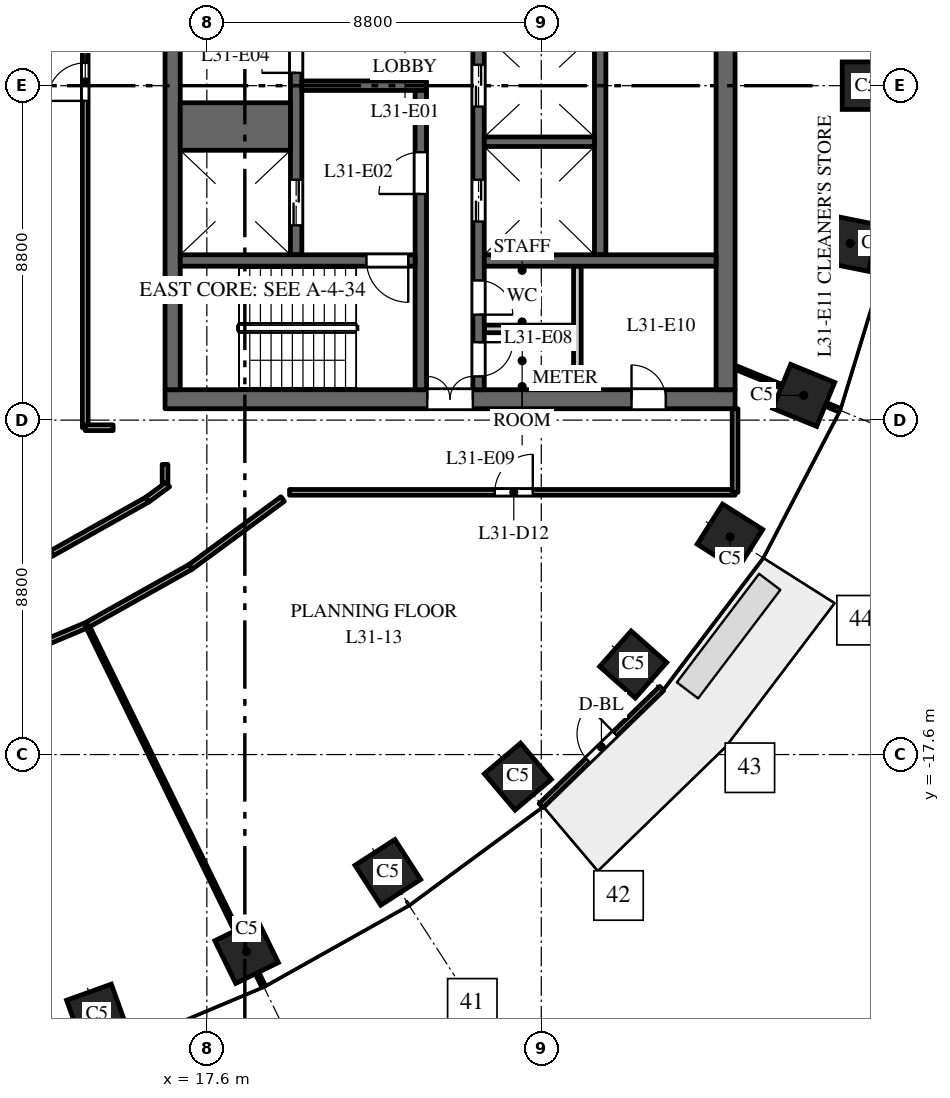
"""IFC4 building model, lengths in metres.
Left out: names, types, materials, properties, quantities, classifications, styles, units other than length and angle.
Written with IfcOpenShell. Run it as: python <this file> out.ifc"""

import sys

from ifc_helpers import new_model, si_unit, direction, frame, frame_2d, origin, origin_2d, place, context, subcontext, project, spatial, rectangle, extrude, element, fill, save


model = new_model("IFC4")
c1 = context("Model", 3, precision=1e-05, world=origin(), true_north=direction((0.0, 1.0)))
c2 = subcontext(c1, "Body", "Model", "MODEL_VIEW")
j1 = project(units=[si_unit("LENGTHUNIT", "METRE"), si_unit("PLANEANGLEUNIT", "RADIAN")], contexts=[c1])
p1 = place(None, origin())
s1 = spatial("IfcSite", under=j1, at=p1, CompositionType="ELEMENT")
p2 = place(p1, origin())
s2 = spatial("IfcBuilding", under=s1, at=p2, CompositionType="ELEMENT")
p3 = place(p2, frame((0.0, 0.0, 136.0)))
s3 = spatial("IfcBuildingStorey", under=s2, at=p3, CompositionType="ELEMENT", Elevation=136.0)
for number, where, z_axis, x_axis in (
    (1, (34.945, 0.0, 0.0), (0.0, 0.0, 1.0), (0.0, 1.0, 0.0)),
    (2, (14.709, -24.441, 0.0), (0.0, 0.0, 1.0), (0.941, 0.338, 0.0)),
    (3, (18.646, -22.785, 0.0), (0.0, 0.0, 1.0), (0.898, 0.439, 0.0)),
    (4, (22.362, -20.7, 0.0), (0.0, 0.0, 1.0), (0.84, 0.542, 0.0)),
    (5, (25.783, -18.18, 0.0), (0.0, 0.0, 1.0), (0.763, 0.646, 0.0)),
    (6, (28.819, -15.23, 0.0), (0.0, 0.0, 1.0), (0.663, 0.749, 0.0)),
    (7, (31.365, -11.871, 0.0), (0.0, 0.0, 1.0), (0.535, 0.845, 0.0)),
    (8, (33.305, -8.149, 0.0), (0.0, 0.0, 1.0), (0.379, 0.925, 0.0)),
    (9, (34.527, -4.151, 0.0), (0.0, 0.0, 1.0), (0.197, 0.98, 0.0)),
):
    element("IfcColumn", number, at=place(p3, frame(where, z_axis=z_axis, x_axis=x_axis)), inside=s3, PredefinedType="COLUMN", context=c2, shape_type="SweptSolid", body=[
        extrude(rectangle(XDim=1.25, YDim=1.25, at=origin_2d()), origin(), (0.0, 0.0, 1.0), 4.0),
    ])
p4 = place(p3, frame((16.5, -8.25, 0.0), z_axis=(0.0, 0.0, 1.0), x_axis=(1.0, 0.0, 0.0)))
e10 = element("IfcWall", 10, at=p4, inside=s3, PredefinedType="SHEAR", context=c2, shape_type="SweptSolid", body=[
    extrude(rectangle(XDim=15.0, YDim=0.5, at=frame_2d((7.5, 0.0))), origin(), (0.0, 0.0, 1.0), 3.7),
])
p5 = place(p4, frame((6.9, 0.0, 0.0)))
e11 = element("IfcOpeningElement", 11, at=p5, cuts=e10, PredefinedType="OPENING", context=c2, shape_type="SweptSolid", body=[
    extrude(rectangle(XDim=1.2, YDim=2.1, at=frame_2d((0.6, 1.05))), frame((0.0, 0.26, 0.0), z_axis=(0.0, -1.0, 0.0), x_axis=(1.0, 0.0, 0.0)), (0.0, 0.0, 1.0), 0.52),
])
p6 = place(p4, frame((12.275, 0.0, 0.0)))
e12 = element("IfcOpeningElement", 12, at=p6, cuts=e10, PredefinedType="OPENING", context=c2, shape_type="SweptSolid", body=[
    extrude(rectangle(XDim=0.9, YDim=2.1, at=frame_2d((0.45, 1.05))), frame((0.0, 0.26, 0.0), z_axis=(0.0, -1.0, 0.0), x_axis=(1.0, 0.0, 0.0)), (0.0, 0.0, 1.0), 0.52),
])
p7 = place(p3, frame((27.95, -4.45, 0.0), z_axis=(0.0, 0.0, 1.0), x_axis=(0.0, 1.0, 0.0)))
e13 = element("IfcWall", 13, at=p7, inside=s3, PredefinedType="SHEAR", context=c2, shape_type="SweptSolid", body=[
    extrude(rectangle(XDim=8.9, YDim=0.3, at=frame_2d((4.45, 0.0))), origin(), (0.0, 0.0, 1.0), 3.7),
])
p8 = place(p3, frame((19.95, -4.45, 0.0), z_axis=(0.0, 0.0, 1.0), x_axis=(0.0, 1.0, 0.0)))
e14 = element("IfcWall", 14, at=p8, inside=s3, PredefinedType="SHEAR", context=c2, shape_type="SweptSolid", body=[
    extrude(rectangle(XDim=8.9, YDim=0.3, at=frame_2d((4.45, 0.0))), origin(), (0.0, 0.0, 1.0), 3.7),
])
p9 = place(p8, frame((0.775, 0.0, 0.0)))
e15 = element("IfcOpeningElement", 15, at=p9, cuts=e14, PredefinedType="OPENING", context=c2, shape_type="SweptSolid", body=[
    extrude(rectangle(XDim=1.2, YDim=2.1, at=frame_2d((0.6, 1.05))), frame((0.0, 0.16, 0.0), z_axis=(0.0, -1.0, 0.0), x_axis=(1.0, 0.0, 0.0)), (0.0, 0.0, 1.0), 0.32),
])
p10 = place(p8, frame((4.788, 0.0, 0.0)))
e16 = element("IfcOpeningElement", 16, at=p10, cuts=e14, PredefinedType="OPENING", context=c2, shape_type="SweptSolid", body=[
    extrude(rectangle(XDim=0.9, YDim=2.1, at=frame_2d((0.45, 1.05))), frame((0.0, 0.16, 0.0), z_axis=(0.0, -1.0, 0.0), x_axis=(1.0, 0.0, 0.0)), (0.0, 0.0, 1.0), 0.32),
])
p11 = place(p8, frame((7.337, 0.0, 0.0)))
e17 = element("IfcOpeningElement", 17, at=p11, cuts=e14, PredefinedType="OPENING", context=c2, shape_type="SweptSolid", body=[
    extrude(rectangle(XDim=0.9, YDim=2.1, at=frame_2d((0.45, 1.05))), frame((0.0, 0.16, 0.0), z_axis=(0.0, -1.0, 0.0), x_axis=(1.0, 0.0, 0.0)), (0.0, 0.0, 1.0), 0.32),
])
p12 = place(p3, frame((24.75, -8.0, 0.0), z_axis=(0.0, 0.0, 1.0), x_axis=(0.0, 1.0, 0.0)))
e18 = element("IfcWall", 18, at=p12, inside=s3, PredefinedType="SHEAR", context=c2, shape_type="SweptSolid", body=[
    extrude(rectangle(XDim=16.0, YDim=0.3, at=frame_2d((8.0, 0.0))), origin(), (0.0, 0.0, 1.0), 3.7),
])
p13 = place(p12, frame((4.425, 0.0, 0.0)))
e19 = element("IfcOpeningElement", 19, at=p13, cuts=e18, PredefinedType="OPENING", context=c2, shape_type="SweptSolid", body=[
    extrude(rectangle(XDim=1.1, YDim=2.1, at=frame_2d((0.55, 1.05))), frame((0.0, 0.16, 0.0), z_axis=(0.0, -1.0, 0.0), x_axis=(1.0, 0.0, 0.0)), (0.0, 0.0, 1.0), 0.32),
])
p14 = place(p12, frame((7.45, 0.0, 0.0)))
e20 = element("IfcOpeningElement", 20, at=p14, cuts=e18, PredefinedType="OPENING", context=c2, shape_type="SweptSolid", body=[
    extrude(rectangle(XDim=1.1, YDim=2.1, at=frame_2d((0.55, 1.05))), frame((0.0, 0.16, 0.0), z_axis=(0.0, -1.0, 0.0), x_axis=(1.0, 0.0, 0.0)), (0.0, 0.0, 1.0), 0.32),
])
p15 = place(p12, frame((10.425, 0.0, 0.0)))
e21 = element("IfcOpeningElement", 21, at=p15, cuts=e18, PredefinedType="OPENING", context=c2, shape_type="SweptSolid", body=[
    extrude(rectangle(XDim=1.2, YDim=2.1, at=frame_2d((0.6, 1.05))), frame((0.0, 0.16, 0.0), z_axis=(0.0, -1.0, 0.0), x_axis=(1.0, 0.0, 0.0)), (0.0, 0.0, 1.0), 0.32),
])
p16 = place(p12, frame((13.75, 0.0, 0.0)))
e22 = element("IfcOpeningElement", 22, at=p16, cuts=e18, PredefinedType="OPENING", context=c2, shape_type="SweptSolid", body=[
    extrude(rectangle(XDim=0.9, YDim=2.1, at=frame_2d((0.45, 1.05))), frame((0.0, 0.16, 0.0), z_axis=(0.0, -1.0, 0.0), x_axis=(1.0, 0.0, 0.0)), (0.0, 0.0, 1.0), 0.32),
])
p17 = place(p12, frame((1.975, 0.0, 0.0)))
e23 = element("IfcOpeningElement", 23, at=p17, cuts=e18, PredefinedType="OPENING", context=c2, shape_type="SweptSolid", body=[
    extrude(rectangle(XDim=0.9, YDim=2.1, at=frame_2d((0.45, 1.05))), frame((0.0, 0.16, 0.0), z_axis=(0.0, -1.0, 0.0), x_axis=(1.0, 0.0, 0.0)), (0.0, 0.0, 1.0), 0.32),
])
p18 = place(p12, frame((0.35, 0.0, 0.0)))
e24 = element("IfcOpeningElement", 24, at=p18, cuts=e18, PredefinedType="OPENING", context=c2, shape_type="SweptSolid", body=[
    extrude(rectangle(XDim=0.9, YDim=2.1, at=frame_2d((0.45, 1.05))), frame((0.0, 0.16, 0.0), z_axis=(0.0, -1.0, 0.0), x_axis=(1.0, 0.0, 0.0)), (0.0, 0.0, 1.0), 0.32),
])
p19 = place(p3, frame((20.1, 0.0, 0.0), z_axis=(0.0, 0.0, 1.0), x_axis=(1.0, 0.0, 0.0)))
e25 = element("IfcWall", 25, at=p19, inside=s3, PredefinedType="SHEAR", context=c2, shape_type="SweptSolid", body=[
    extrude(rectangle(XDim=3.28, YDim=0.25, at=frame_2d((1.64, 0.0))), origin(), (0.0, 0.0, 1.0), 3.7),
])
p20 = place(p3, frame((16.7, -8.0, 0.0), z_axis=(0.0, 0.0, 1.0), x_axis=(0.0, 1.0, 0.0)))
e26 = element("IfcWall", 26, at=p20, inside=s3, PredefinedType="SHEAR", context=c2, shape_type="SweptSolid", body=[
    extrude(rectangle(XDim=16.0, YDim=0.4, at=frame_2d((8.0, 0.0))), origin(), (0.0, 0.0, 1.0), 3.7),
])
p21 = place(p3, frame((31.25, -8.0, 0.0), z_axis=(0.0, 0.0, 1.0), x_axis=(0.0, 1.0, 0.0)))
e27 = element("IfcWall", 27, at=p21, inside=s3, PredefinedType="SHEAR", context=c2, shape_type="SweptSolid", body=[
    extrude(rectangle(XDim=16.0, YDim=0.5, at=frame_2d((8.0, 0.0))), origin(), (0.0, 0.0, 1.0), 3.7),
])
p22 = place(p3, frame((27.35, -8.0, 0.0), z_axis=(0.0, 0.0, 1.0), x_axis=(0.0, 1.0, 0.0)))
e28 = element("IfcWall", 28, at=p22, inside=s3, PredefinedType="PARTITIONING", context=c2, shape_type="SweptSolid", body=[
    extrude(rectangle(XDim=3.25, YDim=0.2, at=frame_2d((1.625, 0.0))), origin(), (0.0, 0.0, 1.0), 3.7),
])
p23 = place(p3, frame((24.9, -6.4, 0.0), z_axis=(0.0, 0.0, 1.0), x_axis=(1.0, 0.0, 0.0)))
e29 = element("IfcWall", 29, at=p23, inside=s3, PredefinedType="PARTITIONING", context=c2, shape_type="SweptSolid", body=[
    extrude(rectangle(XDim=2.35, YDim=0.2, at=frame_2d((1.175, 0.0))), origin(), (0.0, 0.0, 1.0), 3.7),
])
p24 = place(p3, frame((24.9, -4.6, 0.0), z_axis=(0.0, 0.0, 1.0), x_axis=(1.0, 0.0, 0.0)))
e30 = element("IfcWall", 30, at=p24, inside=s3, PredefinedType="SHEAR", context=c2, shape_type="SweptSolid", body=[
    extrude(rectangle(XDim=6.1, YDim=0.3, at=frame_2d((3.05, 0.0))), origin(), (0.0, 0.0, 1.0), 3.7),
])
p25 = place(p3, frame((16.9, -1.075, 0.0), z_axis=(0.0, 0.0, 1.0), x_axis=(1.0, 0.0, 0.0)))
e31 = element("IfcWall", 31, at=p25, inside=s3, PredefinedType="SHEAR", context=c2, shape_type="SweptSolid", body=[
    extrude(rectangle(XDim=2.9, YDim=1.25, at=frame_2d((1.45, 0.0))), origin(), (0.0, 0.0, 1.0), 3.7),
])
p26 = place(p3, frame((24.9, -1.475, 0.0), z_axis=(0.0, 0.0, 1.0), x_axis=(1.0, 0.0, 0.0)))
e32 = element("IfcWall", 32, at=p26, inside=s3, PredefinedType="SHEAR", context=c2, shape_type="SweptSolid", body=[
    extrude(rectangle(XDim=2.9, YDim=0.25, at=frame_2d((1.45, 0.0))), origin(), (0.0, 0.0, 1.0), 3.7),
])
p27 = place(p3, frame((23.23, -8.0, 0.0), z_axis=(0.0, 0.0, 1.0), x_axis=(0.0, 1.0, 0.0)))
e33 = element("IfcWall", 33, at=p27, inside=s3, PredefinedType="SHEAR", context=c2, shape_type="SweptSolid", body=[
    extrude(rectangle(XDim=7.875, YDim=0.3, at=frame_2d((3.938, 0.0))), origin(), (0.0, 0.0, 1.0), 3.7),
])
p28 = place(p27, frame((5.15, 0.0, 0.0)))
e34 = element("IfcOpeningElement", 34, at=p28, cuts=e33, PredefinedType="OPENING", context=c2, shape_type="SweptSolid", body=[
    extrude(rectangle(XDim=1.1, YDim=2.1, at=frame_2d((0.55, 1.05))), frame((0.0, 0.16, 0.0), z_axis=(0.0, -1.0, 0.0), x_axis=(1.0, 0.0, 0.0)), (0.0, 0.0, 1.0), 0.32),
])
p29 = place(p3, frame((16.9, -4.6, 0.0), z_axis=(0.0, 0.0, 1.0), x_axis=(1.0, 0.0, 0.0)))
e35 = element("IfcWall", 35, at=p29, inside=s3, PredefinedType="SHEAR", context=c2, shape_type="SweptSolid", body=[
    extrude(rectangle(XDim=6.18, YDim=0.3, at=frame_2d((3.09, 0.0))), origin(), (0.0, 0.0, 1.0), 3.7),
])
p30 = place(p29, frame((4.9, 0.0, 0.0)))
e36 = element("IfcOpeningElement", 36, at=p30, cuts=e35, PredefinedType="OPENING", context=c2, shape_type="SweptSolid", body=[
    extrude(rectangle(XDim=1.1, YDim=2.1, at=frame_2d((0.55, 1.05))), frame((0.0, 0.16, 0.0), z_axis=(0.0, -1.0, 0.0), x_axis=(1.0, 0.0, 0.0)), (0.0, 0.0, 1.0), 0.32),
])
p31 = place(p3, frame((26.396, -18.943, 0.0), z_axis=(0.0, 0.0, 1.0), x_axis=(0.717214761864, 0.696852197647, 0.0)))
e37 = element("IfcWall", 37, at=p31, inside=s3, PredefinedType="STANDARD", context=c2, shape_type="SweptSolid", body=[
    extrude(rectangle(XDim=4.424, YDim=0.15, at=frame_2d((2.212, 0.0))), origin(), (0.0, 0.0, 1.0), 3.7),
])
p32 = place(p31, frame((1.712, 0.0, 0.0)))
e38 = element("IfcOpeningElement", 38, at=p32, cuts=e37, PredefinedType="OPENING", context=c2, shape_type="SweptSolid", body=[
    extrude(rectangle(XDim=1.0, YDim=2.4, at=frame_2d((0.5, 1.2))), frame((0.0, 0.085, 0.0), z_axis=(0.0, -1.0, 0.0), x_axis=(1.0, 0.0, 0.0)), (0.0, 0.0, 1.0), 0.17),
])
p33 = place(p3, frame((10.762, -13.463, 0.0), z_axis=(0.0, 0.0, 1.0), x_axis=(0.921848667289, 0.387550041438, 0.0)))
e39 = element("IfcWall", 39, at=p33, inside=s3, PredefinedType="PARTITIONING", context=c2, shape_type="SweptSolid", body=[
    extrude(rectangle(XDim=2.993, YDim=0.15, at=frame_2d((1.497, 0.0))), origin(), (0.0, 0.0, 1.0), 3.7),
])
p34 = place(p3, frame((11.473, -15.442, 0.0), z_axis=(0.0, 0.0, 1.0), x_axis=(0.921794929211, 0.387677841101, 0.0)))
e40 = element("IfcWall", 40, at=p34, inside=s3, PredefinedType="PARTITIONING", context=c2, shape_type="SweptSolid", body=[
    extrude(rectangle(XDim=3.224, YDim=0.15, at=frame_2d((1.612, 0.0))), origin(), (0.0, 0.0, 1.0), 3.7),
])
p35 = place(p3, frame((13.521, -12.303, 0.0), z_axis=(0.0, 0.0, 1.0), x_axis=(0.871948863789, 0.489596955604, 0.0)))
e41 = element("IfcWall", 41, at=p35, inside=s3, PredefinedType="PARTITIONING", context=c2, shape_type="SweptSolid", body=[
    extrude(rectangle(XDim=2.88, YDim=0.15, at=frame_2d((1.44, 0.0))), origin(), (0.0, 0.0, 1.0), 3.7),
])
p36 = place(p3, frame((14.4, -9.0, 0.0), z_axis=(0.0, 0.0, 1.0), x_axis=(0.0, 1.0, 0.0)))
e42 = element("IfcWall", 42, at=p36, inside=s3, PredefinedType="PARTITIONING", context=c2, shape_type="SweptSolid", body=[
    extrude(rectangle(XDim=18.0, YDim=0.15, at=frame_2d((9.0, 0.0))), origin(), (0.0, 0.0, 1.0), 2.75),
])
p37 = place(p36, frame((8.6, 0.0, 0.0)))
e43 = element("IfcOpeningElement", 43, at=p37, cuts=e42, PredefinedType="OPENING", context=c2, shape_type="SweptSolid", body=[
    extrude(rectangle(XDim=1.0, YDim=2.1, at=frame_2d((0.5, 1.05))), frame((0.0, 0.085, 0.0), z_axis=(0.0, -1.0, 0.0), x_axis=(1.0, 0.0, 0.0)), (0.0, 0.0, 1.0), 0.17),
])
p38 = place(p3, frame((14.4, -9.0, 0.0), z_axis=(0.0, 0.0, 1.0), x_axis=(1.0, 0.0, 0.0)))
e44 = element("IfcWall", 44, at=p38, inside=s3, PredefinedType="PARTITIONING", context=c2, shape_type="SweptSolid", body=[
    extrude(rectangle(XDim=0.734, YDim=0.15, at=frame_2d((0.367, 0.0))), origin(), (0.0, 0.0, 1.0), 3.7),
])
p39 = place(p3, frame((14.447, -14.196, 0.0), z_axis=(0.0, 0.0, 1.0), x_axis=(0.439198109491, -0.898390238493, 0.0)))
e45 = element("IfcWall", 45, at=p39, inside=s3, PredefinedType="PARTITIONING", context=c2, shape_type="SweptSolid", body=[
    extrude(rectangle(XDim=10.562, YDim=0.1, at=frame_2d((5.281, 0.0))), origin(), (0.0, 0.0, 1.0), 2.9),
])
p40 = place(p3, frame((14.462, -14.182, 0.0), z_axis=(0.0, 0.0, 1.0), x_axis=(0.872130780857, 0.489272828882, 0.0)))
e46 = element("IfcWall", 46, at=p40, inside=s3, PredefinedType="PARTITIONING", context=c2, shape_type="SweptSolid", body=[
    extrude(rectangle(XDim=3.109, YDim=0.15, at=frame_2d((1.554, 0.0))), origin(), (0.0, 0.0, 1.0), 3.7),
])
p41 = place(p3, frame((16.032, -10.893, 0.0), z_axis=(0.0, 0.0, 1.0), x_axis=(0.805701862575, 0.592321288359, 0.0)))
e47 = element("IfcWall", 47, at=p41, inside=s3, PredefinedType="PARTITIONING", context=c2, shape_type="SweptSolid", body=[
    extrude(rectangle(XDim=0.674, YDim=0.15, at=frame_2d((0.337, 0.0))), origin(), (0.0, 0.0, 1.0), 3.7),
])
p42 = place(p3, frame((16.5, -10.456, 0.0), z_axis=(0.0, 0.0, 1.0), x_axis=(0.0, 1.0, 0.0)))
e48 = element("IfcWall", 48, at=p42, inside=s3, PredefinedType="PARTITIONING", context=c2, shape_type="SweptSolid", body=[
    extrude(rectangle(XDim=0.492, YDim=0.15, at=frame_2d((0.246, 0.0))), origin(), (0.0, 0.0, 1.0), 3.7),
])
p43 = place(p3, frame((17.173, -12.661, 0.0), z_axis=(0.0, 0.0, 1.0), x_axis=(0.805151708762, 0.593068904831, 0.0)))
e49 = element("IfcWall", 49, at=p43, inside=s3, PredefinedType="PARTITIONING", context=c2, shape_type="SweptSolid", body=[
    extrude(rectangle(XDim=3.008, YDim=0.15, at=frame_2d((1.504, 0.0))), origin(), (0.0, 0.0, 1.0), 3.7),
])
p44 = place(p3, frame((19.777, -10.7, 0.0), z_axis=(0.0, 0.0, 1.0), x_axis=(1.0, 0.0, 0.0)))
e50 = element("IfcWall", 50, at=p44, inside=s3, PredefinedType="PARTITIONING", context=c2, shape_type="SweptSolid", body=[
    extrude(rectangle(XDim=11.723, YDim=0.15, at=frame_2d((5.861, 0.0))), origin(), (0.0, 0.0, 1.0), 2.75),
])
p45 = place(p44, frame((5.4, 0.0, 0.0)))
e51 = element("IfcOpeningElement", 51, at=p45, cuts=e50, PredefinedType="OPENING", context=c2, shape_type="SweptSolid", body=[
    extrude(rectangle(XDim=1.0, YDim=2.1, at=frame_2d((0.5, 1.05))), frame((0.0, 0.085, 0.0), z_axis=(0.0, -1.0, 0.0), x_axis=(1.0, 0.0, 0.0)), (0.0, 0.0, 1.0), 0.17),
])
p46 = place(p3, frame((31.5, -10.7, 0.0), z_axis=(0.0, 0.0, 1.0), x_axis=(0.0, 1.0, 0.0)))
e52 = element("IfcWall", 52, at=p46, inside=s3, PredefinedType="PARTITIONING", context=c2, shape_type="SweptSolid", body=[
    extrude(rectangle(XDim=2.2, YDim=0.15, at=frame_2d((1.1, 0.0))), origin(), (0.0, 0.0, 1.0), 2.9),
])
p47 = place(p3, frame((31.5, -7.41, 0.0), z_axis=(0.0, 0.0, 1.0), x_axis=(0.925344112436, -0.379128307542, 0.0)))
e53 = element("IfcWall", 53, at=p47, inside=s3, PredefinedType="PARTITIONING", context=c2, shape_type="SweptSolid", body=[
    extrude(rectangle(XDim=2.954, YDim=0.1, at=frame_2d((1.477, 0.0))), origin(), (0.0, 0.0, 1.0), 3.7),
])
p48 = place(p9, origin())
e54 = element("IfcDoor", 54, at=p48, inside=s3, OperationType="DOUBLE_DOOR_SLIDING", PredefinedType="DOOR", context=c2, shape_type="SweptSolid", body=[
    extrude(rectangle(XDim=1.2, YDim=2.1, at=frame_2d((0.6, 1.05))), frame((0.0, 0.025, 0.0), z_axis=(0.0, -1.0, 0.0), x_axis=(1.0, 0.0, 0.0)), (0.0, 0.0, 1.0), 0.05),
])
fill(e15, e54)
p49 = place(p13, origin())
e55 = element("IfcDoor", 55, at=p49, inside=s3, OperationType="DOUBLE_DOOR_SLIDING", PredefinedType="DOOR", context=c2, shape_type="SweptSolid", body=[
    extrude(rectangle(XDim=1.1, YDim=2.1, at=frame_2d((0.55, 1.05))), frame((0.0, 0.025, 0.0), z_axis=(0.0, -1.0, 0.0), x_axis=(1.0, 0.0, 0.0)), (0.0, 0.0, 1.0), 0.05),
])
fill(e19, e55)
p50 = place(p14, origin())
e56 = element("IfcDoor", 56, at=p50, inside=s3, OperationType="DOUBLE_DOOR_SLIDING", PredefinedType="DOOR", context=c2, shape_type="SweptSolid", body=[
    extrude(rectangle(XDim=1.1, YDim=2.1, at=frame_2d((0.55, 1.05))), frame((0.0, 0.025, 0.0), z_axis=(0.0, -1.0, 0.0), x_axis=(1.0, 0.0, 0.0)), (0.0, 0.0, 1.0), 0.05),
])
fill(e20, e56)
p51 = place(p30, origin())
e57 = element("IfcDoor", 57, at=p51, inside=s3, OperationType="SINGLE_SWING_RIGHT", PredefinedType="DOOR", context=c2, shape_type="SweptSolid", body=[
    extrude(rectangle(XDim=1.1, YDim=2.1, at=frame_2d((0.55, 1.05))), frame((0.0, 0.025, 0.0), z_axis=(0.0, -1.0, 0.0), x_axis=(1.0, 0.0, 0.0)), (0.0, 0.0, 1.0), 0.05),
])
fill(e36, e57)
p52 = place(p28, origin())
e58 = element("IfcDoor", 58, at=p52, inside=s3, OperationType="SINGLE_SWING_RIGHT", PredefinedType="DOOR", context=c2, shape_type="SweptSolid", body=[
    extrude(rectangle(XDim=1.1, YDim=2.1, at=frame_2d((0.55, 1.05))), frame((0.0, 0.025, 0.0), z_axis=(0.0, -1.0, 0.0), x_axis=(1.0, 0.0, 0.0)), (0.0, 0.0, 1.0), 0.05),
])
fill(e34, e58)
p53 = place(p5, origin())
e59 = element("IfcDoor", 59, at=p53, inside=s3, OperationType="DOUBLE_DOOR_DOUBLE_SWING", PredefinedType="DOOR", context=c2, shape_type="SweptSolid", body=[
    extrude(rectangle(XDim=1.2, YDim=2.1, at=frame_2d((0.6, 1.05))), frame((0.0, 0.025, 0.0), z_axis=(0.0, -1.0, 0.0), x_axis=(1.0, 0.0, 0.0)), (0.0, 0.0, 1.0), 0.05),
])
fill(e11, e59)
p54 = place(p10, origin())
e60 = element("IfcDoor", 60, at=p54, inside=s3, OperationType="SINGLE_SWING_RIGHT", PredefinedType="DOOR", context=c2, shape_type="SweptSolid", body=[
    extrude(rectangle(XDim=0.9, YDim=2.1, at=frame_2d((0.45, 1.05))), frame((0.0, 0.025, 0.0), z_axis=(0.0, -1.0, 0.0), x_axis=(1.0, 0.0, 0.0)), (0.0, 0.0, 1.0), 0.05),
])
fill(e16, e60)
p55 = place(p17, origin())
e61 = element("IfcDoor", 61, at=p55, inside=s3, OperationType="SINGLE_SWING_LEFT", PredefinedType="DOOR", context=c2, shape_type="SweptSolid", body=[
    extrude(rectangle(XDim=0.9, YDim=2.1, at=frame_2d((0.45, 1.05))), frame((0.0, 0.025, 0.0), z_axis=(0.0, -1.0, 0.0), x_axis=(1.0, 0.0, 0.0)), (0.0, 0.0, 1.0), 0.05),
])
fill(e23, e61)
p56 = place(p18, origin())
e62 = element("IfcDoor", 62, at=p56, inside=s3, OperationType="SINGLE_SWING_RIGHT", PredefinedType="DOOR", context=c2, shape_type="SweptSolid", body=[
    extrude(rectangle(XDim=0.9, YDim=2.1, at=frame_2d((0.45, 1.05))), frame((0.0, 0.025, 0.0), z_axis=(0.0, -1.0, 0.0), x_axis=(1.0, 0.0, 0.0)), (0.0, 0.0, 1.0), 0.05),
])
fill(e24, e62)
p57 = place(p6, origin())
e63 = element("IfcDoor", 63, at=p57, inside=s3, OperationType="SINGLE_SWING_RIGHT", PredefinedType="DOOR", context=c2, shape_type="SweptSolid", body=[
    extrude(rectangle(XDim=0.9, YDim=2.1, at=frame_2d((0.45, 1.05))), frame((0.0, 0.025, 0.0), z_axis=(0.0, -1.0, 0.0), x_axis=(1.0, 0.0, 0.0)), (0.0, 0.0, 1.0), 0.05),
])
fill(e12, e63)
p58 = place(p32, origin())
e64 = element("IfcDoor", 64, at=p58, inside=s3, OperationType="SINGLE_SWING_RIGHT", PredefinedType="DOOR", context=c2, shape_type="SweptSolid", body=[
    extrude(rectangle(XDim=1.0, YDim=2.4, at=frame_2d((0.5, 1.2))), frame((0.0, 0.025, 0.0), z_axis=(0.0, -1.0, 0.0), x_axis=(1.0, 0.0, 0.0)), (0.0, 0.0, 1.0), 0.05),
])
fill(e38, e64)
p59 = place(p45, origin())
e65 = element("IfcDoor", 65, at=p59, inside=s3, OperationType="SINGLE_SWING_RIGHT", PredefinedType="DOOR", context=c2, shape_type="SweptSolid", body=[
    extrude(rectangle(XDim=1.0, YDim=2.1, at=frame_2d((0.5, 1.05))), frame((0.0, 0.025, 0.0), z_axis=(0.0, -1.0, 0.0), x_axis=(1.0, 0.0, 0.0)), (0.0, 0.0, 1.0), 0.05),
])
fill(e51, e65)
p60 = place(p37, origin())
e66 = element("IfcDoor", 66, at=p60, inside=s3, OperationType="SINGLE_SWING_LEFT", PredefinedType="DOOR", context=c2, shape_type="SweptSolid", body=[
    extrude(rectangle(XDim=1.0, YDim=2.1, at=frame_2d((0.5, 1.05))), frame((0.0, 0.025, 0.0), z_axis=(0.0, -1.0, 0.0), x_axis=(1.0, 0.0, 0.0)), (0.0, 0.0, 1.0), 0.05),
])
fill(e43, e66)
save(model, sys.argv[1])
